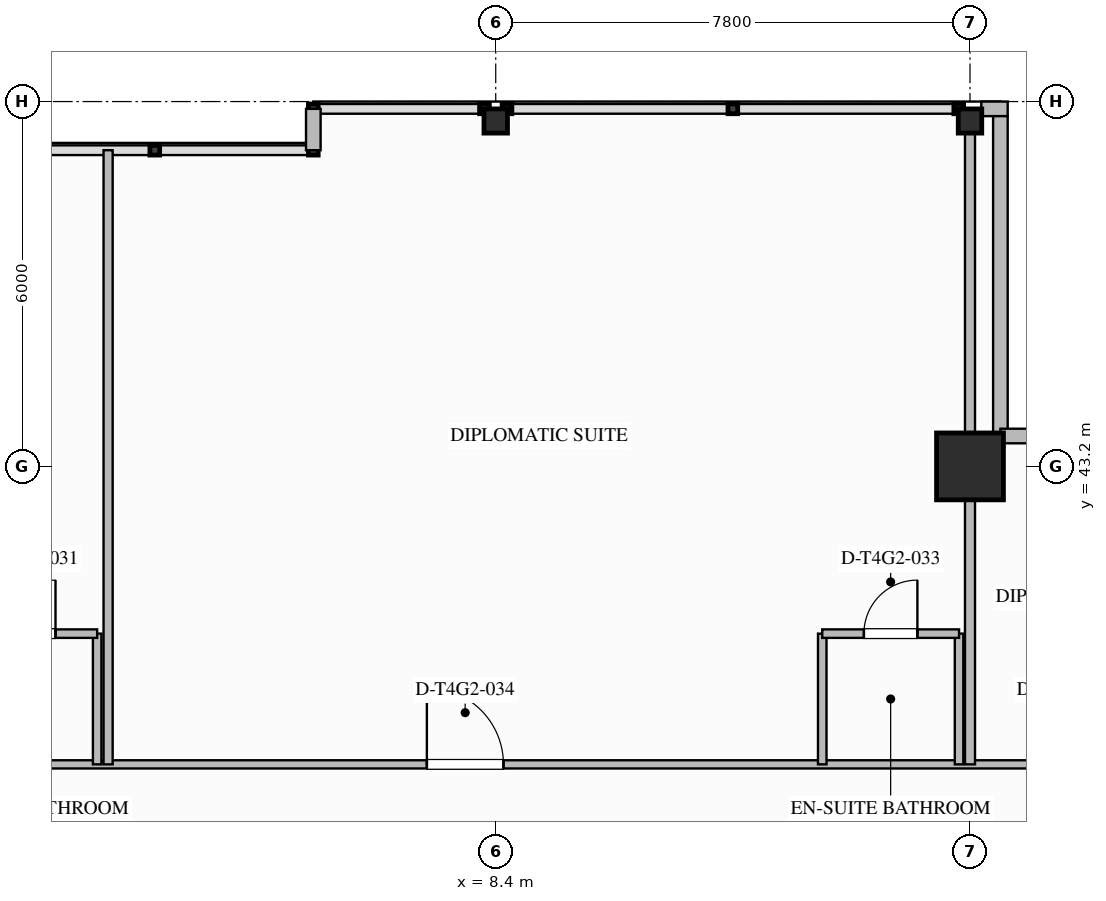
"""IFC4 building model, lengths in metres.
Left out: names, types, materials, properties, quantities, classifications, styles, units other than length and angle.
Written with IfcOpenShell. Run it as: python <this file> out.ifc"""

import sys

from ifc_helpers import new_model, si_unit, direction, frame, frame_2d, origin, origin_2d, place, context, subcontext, project, spatial, rectangle, i_section, extrude, element, fill, save


model = new_model("IFC4")
c1 = context("Model", 3, precision=1e-05, world=origin(), true_north=direction((0.0, 1.0)))
c2 = subcontext(c1, "Body", "Model", "MODEL_VIEW")
j1 = project(units=[si_unit("LENGTHUNIT", "METRE"), si_unit("PLANEANGLEUNIT", "RADIAN")], contexts=[c1])
p1 = place(None, origin())
s1 = spatial("IfcSite", under=j1, at=p1, CompositionType="ELEMENT")
p2 = place(p1, origin())
s2 = spatial("IfcBuilding", under=s1, at=p2, CompositionType="ELEMENT")
p3 = place(p2, frame((0.0, 0.0, 215.9)))
s3 = spatial("IfcBuildingStorey", under=s2, at=p3, CompositionType="ELEMENT", Elevation=215.9)
p4 = place(p3, frame((16.2, 43.2, 0.0), z_axis=(0.0, 0.0, 1.0), x_axis=(1.0, 0.0, 0.0)))
e1 = element("IfcColumn", 1, at=p4, inside=s3, PredefinedType="COLUMN", context=c2, shape_type="SweptSolid", body=[
    extrude(rectangle(XDim=1.1, YDim=1.1, at=origin_2d()), origin(), (0.0, 0.0, 1.0), 3.6),
])
for number, where, z_axis, x_axis in (
    (2, (8.4, 48.88, 0.0), (0.0, 0.0, 1.0), (0.0, 1.0, 0.0)),
    (3, (16.2, 48.88, 0.0), (0.0, 0.0, 1.0), (0.0, 1.0, 0.0)),
):
    element("IfcColumn", number, at=place(p3, frame(where, z_axis=z_axis, x_axis=x_axis)), inside=s3, PredefinedType="COLUMN", context=c2, shape_type="SweptSolid", body=[
        extrude(i_section(OverallWidth=0.397, OverallDepth=0.387, WebThickness=0.021, FlangeThickness=0.033, FilletRadius=0.025, at=origin_2d()), origin(), (0.0, 0.0, 1.0), 3.597),
    ])
p5 = place(p3, frame((16.385, 49.08, 0.0), z_axis=(0.0, 0.0, 1.0), x_axis=(1.0, 0.0, 0.0)))
e4 = element("IfcWall", 4, at=p5, inside=s3, PredefinedType="STANDARD", context=c2, shape_type="SweptSolid", body=[
    extrude(rectangle(XDim=0.435, YDim=0.24, at=frame_2d((0.217, 0.0))), origin(), (0.0, 0.0, 1.0), 3.34),
])
for number, where, z_axis, x_axis in (
    (5, (16.7, 48.96, 0.0), (0.0, 0.0, 1.0), (0.0, -1.0, 0.0)),
    (6, (16.7, 43.7, 0.0), (0.0, 0.0, 1.0), (1.0, 0.0, 0.0)),
):
    element("IfcWall", number, at=place(p3, frame(where, z_axis=z_axis, x_axis=x_axis)), inside=s3, PredefinedType="STANDARD", context=c2, shape_type="SweptSolid", body=[
        extrude(rectangle(XDim=5.26, YDim=0.24, at=frame_2d((2.63, 0.0))), origin(), (0.0, 0.0, 1.0), 3.34),
    ])
p6 = place(p3, frame((5.4, 48.4, 0.0), z_axis=(0.0, 0.0, 1.0), x_axis=(0.0, 1.0, 0.0)))
e7 = element("IfcWall", 7, at=p6, inside=s3, PredefinedType="STANDARD", context=c2, shape_type="SweptSolid", body=[
    extrude(rectangle(XDim=0.68, YDim=0.24, at=frame_2d((0.34, 0.0))), origin(), (0.0, 0.0, 1.0), 3.34),
])
p7 = place(p3, frame((-16.2, 38.3, 0.0), z_axis=(0.0, 0.0, 1.0), x_axis=(1.0, 0.0, 0.0)))
e8 = element("IfcWall", 8, at=p7, inside=s3, PredefinedType="PARTITIONING", context=c2, shape_type="SweptSolid", body=[
    extrude(rectangle(XDim=38.28, YDim=0.135, at=frame_2d((19.14, 0.0))), origin(), (0.0, 0.0, 1.0), 3.34),
])
p8 = place(p7, frame((33.355, 0.0, 0.0)))
e9 = element("IfcOpeningElement", 9, at=p8, cuts=e8, PredefinedType="OPENING", context=c2, shape_type="SweptSolid", body=[
    extrude(rectangle(XDim=1.26, YDim=2.2, at=frame_2d((0.63, 1.1))), frame((0.0, 0.077, 0.0), z_axis=(0.0, -1.0, 0.0), x_axis=(1.0, 0.0, 0.0)), (0.0, 0.0, 1.0), 0.155),
])
p9 = place(p7, frame((7.268, 0.0, 0.0)))
e10 = element("IfcOpeningElement", 10, at=p9, cuts=e8, PredefinedType="OPENING", context=c2, shape_type="SweptSolid", body=[
    extrude(rectangle(XDim=1.26, YDim=2.2, at=frame_2d((0.63, 1.1))), frame((0.0, 0.077, 0.0), z_axis=(0.0, -1.0, 0.0), x_axis=(1.0, 0.0, 0.0)), (0.0, 0.0, 1.0), 0.155),
])
p10 = place(p7, frame((23.468, 0.0, 0.0)))
e11 = element("IfcOpeningElement", 11, at=p10, cuts=e8, PredefinedType="OPENING", context=c2, shape_type="SweptSolid", body=[
    extrude(rectangle(XDim=1.26, YDim=2.2, at=frame_2d((0.63, 1.1))), frame((0.0, 0.077, 0.0), z_axis=(0.0, -1.0, 0.0), x_axis=(1.0, 0.0, 0.0)), (0.0, 0.0, 1.0), 0.155),
])
p11 = place(p3, frame((16.2, 38.3, 0.0), z_axis=(0.0, 0.0, 1.0), x_axis=(0.0, 1.0, 0.0)))
e12 = element("IfcWall", 12, at=p11, inside=s3, PredefinedType="PARTITIONING", context=c2, shape_type="SweptSolid", body=[
    extrude(rectangle(XDim=10.78, YDim=0.165, at=frame_2d((5.39, 0.0))), origin(), (0.0, 0.0, 1.0), 2.714),
])
p12 = place(p3, frame((1.845, 38.3, 0.0), z_axis=(0.0, 0.0, 1.0), x_axis=(0.0, 1.0, 0.0)))
e13 = element("IfcWall", 13, at=p12, inside=s3, PredefinedType="PLUMBINGWALL", context=c2, shape_type="SweptSolid", body=[
    extrude(rectangle(XDim=2.15, YDim=0.14, at=frame_2d((1.075, 0.0))), origin(), (0.0, 0.0, 1.0), 3.34),
])
p13 = place(p3, frame((-0.405, 40.45, 0.0), z_axis=(0.0, 0.0, 1.0), x_axis=(1.0, 0.0, 0.0)))
e14 = element("IfcWall", 14, at=p13, inside=s3, PredefinedType="PLUMBINGWALL", context=c2, shape_type="SweptSolid", body=[
    extrude(rectangle(XDim=2.25, YDim=0.14, at=frame_2d((1.125, 0.0))), origin(), (0.0, 0.0, 1.0), 3.34),
])
p14 = place(p13, frame((0.685, 0.0, 0.0)))
e15 = element("IfcOpeningElement", 15, at=p14, cuts=e14, PredefinedType="OPENING", context=c2, shape_type="SweptSolid", body=[
    extrude(rectangle(XDim=0.88, YDim=2.1, at=frame_2d((0.44, 1.05))), frame((0.0, 0.08, 0.0), z_axis=(0.0, -1.0, 0.0), x_axis=(1.0, 0.0, 0.0)), (0.0, 0.0, 1.0), 0.16),
])
p15 = place(p3, frame((2.025, 38.3, 0.0), z_axis=(0.0, 0.0, 1.0), x_axis=(0.0, 1.0, 0.0)))
e16 = element("IfcWall", 16, at=p15, inside=s3, PredefinedType="PARTITIONING", context=c2, shape_type="SweptSolid", body=[
    extrude(rectangle(XDim=10.1, YDim=0.15, at=frame_2d((5.05, 0.0))), origin(), (0.0, 0.0, 1.0), 3.34),
])
p16 = place(p3, frame((13.77, 38.3, 0.0), z_axis=(0.0, 0.0, 1.0), x_axis=(0.0, 1.0, 0.0)))
e17 = element("IfcWall", 17, at=p16, inside=s3, PredefinedType="PLUMBINGWALL", context=c2, shape_type="SweptSolid", body=[
    extrude(rectangle(XDim=2.15, YDim=0.14, at=frame_2d((1.075, 0.0))), origin(), (0.0, 0.0, 1.0), 3.34),
])
p17 = place(p3, frame((16.02, 38.3, 0.0), z_axis=(0.0, 0.0, 1.0), x_axis=(0.0, 1.0, 0.0)))
e18 = element("IfcWall", 18, at=p17, inside=s3, PredefinedType="PLUMBINGWALL", context=c2, shape_type="SweptSolid", body=[
    extrude(rectangle(XDim=2.15, YDim=0.14, at=frame_2d((1.075, 0.0))), origin(), (0.0, 0.0, 1.0), 2.714),
])
p18 = place(p3, frame((13.77, 40.45, 0.0), z_axis=(0.0, 0.0, 1.0), x_axis=(1.0, 0.0, 0.0)))
e19 = element("IfcWall", 19, at=p18, inside=s3, PredefinedType="PLUMBINGWALL", context=c2, shape_type="SweptSolid", body=[
    extrude(rectangle(XDim=2.25, YDim=0.14, at=frame_2d((1.125, 0.0))), origin(), (0.0, 0.0, 1.0), 3.34),
])
p19 = place(p18, frame((0.685, 0.0, 0.0)))
e20 = element("IfcOpeningElement", 20, at=p19, cuts=e19, PredefinedType="OPENING", context=c2, shape_type="SweptSolid", body=[
    extrude(rectangle(XDim=0.88, YDim=2.1, at=frame_2d((0.44, 1.05))), frame((0.0, 0.08, 0.0), z_axis=(0.0, -1.0, 0.0), x_axis=(1.0, 0.0, 0.0)), (0.0, 0.0, 1.0), 0.16),
])
p20 = place(p14, origin())
e21 = element("IfcDoor", 21, at=p20, inside=s3, OperationType="SINGLE_SWING_RIGHT", PredefinedType="DOOR", context=c2, shape_type="SweptSolid", body=[
    extrude(rectangle(XDim=0.88, YDim=2.1, at=frame_2d((0.44, 1.05))), frame((0.0, 0.025, 0.0), z_axis=(0.0, -1.0, 0.0), x_axis=(1.0, 0.0, 0.0)), (0.0, 0.0, 1.0), 0.05),
])
fill(e15, e21)
p21 = place(p19, origin())
e22 = element("IfcDoor", 22, at=p21, inside=s3, OperationType="SINGLE_SWING_RIGHT", PredefinedType="DOOR", context=c2, shape_type="SweptSolid", body=[
    extrude(rectangle(XDim=0.88, YDim=2.1, at=frame_2d((0.44, 1.05))), frame((0.0, 0.025, 0.0), z_axis=(0.0, -1.0, 0.0), x_axis=(1.0, 0.0, 0.0)), (0.0, 0.0, 1.0), 0.05),
])
fill(e20, e22)
p22 = place(p10, origin())
e23 = element("IfcDoor", 23, at=p22, inside=s3, OperationType="SINGLE_SWING_LEFT", PredefinedType="DOOR", context=c2, shape_type="SweptSolid", body=[
    extrude(rectangle(XDim=1.26, YDim=2.2, at=frame_2d((0.63, 1.1))), frame((0.0, 0.025, 0.0), z_axis=(0.0, -1.0, 0.0), x_axis=(1.0, 0.0, 0.0)), (0.0, 0.0, 1.0), 0.05),
])
fill(e11, e23)
save(model, sys.argv[1])
